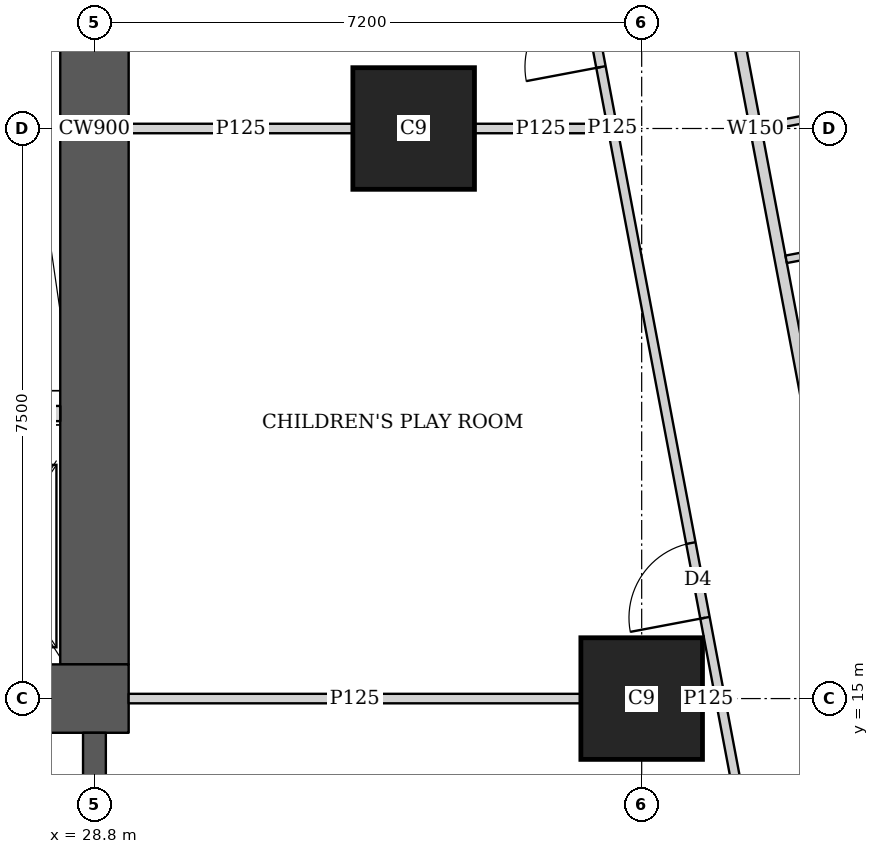
"""IFC4 building model, lengths in metres.
Left out: names, types, materials, properties, quantities, classifications, styles, units other than length and angle.
Written with IfcOpenShell. Run it as: python <this file> out.ifc"""

import sys

from ifc_helpers import new_model, si_unit, direction, frame, frame_2d, origin, origin_2d, place, context, subcontext, project, spatial, rectangle, extrude, element, fill, save


model = new_model("IFC4")
c1 = context("Model", 3, precision=1e-05, world=origin(), true_north=direction((0.0, 1.0)))
c2 = subcontext(c1, "Body", "Model", "MODEL_VIEW")
j1 = project(units=[si_unit("LENGTHUNIT", "METRE"), si_unit("PLANEANGLEUNIT", "RADIAN")], contexts=[c1])
p1 = place(None, origin())
s1 = spatial("IfcSite", under=j1, at=p1, CompositionType="ELEMENT")
p2 = place(p1, origin())
s2 = spatial("IfcBuilding", under=s1, at=p2, CompositionType="ELEMENT")
p3 = place(p2, frame((0.0, 0.0, 89.15)))
s3 = spatial("IfcBuildingStorey", under=s2, at=p3, CompositionType="ELEMENT", Elevation=89.15)
for number, where, z_axis, x_axis in (
    (1, (36.0, 15.0, 0.0), (0.0, 0.0, 1.0), (1.0, 0.0, 0.0)),
    (2, (33.0, 22.5, 0.0), (0.0, 0.0, 1.0), (1.0, 0.0, 0.0)),
):
    element("IfcColumn", number, at=place(p3, frame(where, z_axis=z_axis, x_axis=x_axis)), inside=s3, PredefinedType="COLUMN", context=c2, shape_type="SweptSolid", body=[
        extrude(rectangle(XDim=1.6, YDim=1.6, at=origin_2d()), origin(), (0.0, 0.0, 1.0), 3.75),
    ])
p4 = place(p3, frame((13.95, 15.0, 0.0), z_axis=(0.0, 0.0, 1.0), x_axis=(1.0, 0.0, 0.0)))
e3 = element("IfcWall", 3, at=p4, inside=s3, PredefinedType="SHEAR", context=c2, shape_type="SweptSolid", body=[
    extrude(rectangle(XDim=15.3, YDim=0.9, at=frame_2d((7.65, 0.0))), origin(), (0.0, 0.0, 1.0), 3.75),
])
p5 = place(p4, frame((4.45, 0.0, 0.0)))
e4 = element("IfcOpeningElement", 4, at=p5, cuts=e3, PredefinedType="OPENING", context=c2, shape_type="SweptSolid", body=[
    extrude(rectangle(XDim=1.8, YDim=2.1, at=frame_2d((0.9, 1.05))), frame((0.0, 0.46, 0.0), z_axis=(0.0, -1.0, 0.0), x_axis=(1.0, 0.0, 0.0)), (0.0, 0.0, 1.0), 0.92),
])
p6 = place(p4, frame((10.7, 0.0, 0.0)))
e5 = element("IfcOpeningElement", 5, at=p6, cuts=e3, PredefinedType="OPENING", context=c2, shape_type="SweptSolid", body=[
    extrude(rectangle(XDim=1.1, YDim=2.1, at=frame_2d((0.55, 1.05))), frame((0.0, 0.46, 0.0), z_axis=(0.0, -1.0, 0.0), x_axis=(1.0, 0.0, 0.0)), (0.0, 0.0, 1.0), 0.92),
])
p7 = place(p3, frame((28.8, 15.45, 0.0), z_axis=(0.0, 0.0, 1.0), x_axis=(0.0, 1.0, 0.0)))
e6 = element("IfcWall", 6, at=p7, inside=s3, PredefinedType="SHEAR", context=c2, shape_type="SweptSolid", body=[
    extrude(rectangle(XDim=14.1, YDim=0.9, at=frame_2d((7.05, 0.0))), origin(), (0.0, 0.0, 1.0), 3.75),
])
p8 = place(p3, frame((28.8, 10.35, 0.0), z_axis=(0.0, 0.0, 1.0), x_axis=(0.0, 1.0, 0.0)))
e7 = element("IfcWall", 7, at=p8, inside=s3, PredefinedType="SHEAR", context=c2, shape_type="SweptSolid", body=[
    extrude(rectangle(XDim=4.2, YDim=0.3, at=frame_2d((2.1, 0.0))), origin(), (0.0, 0.0, 1.0), 3.75),
])
p9 = place(p3, frame((33.127, 45.65, 0.0), z_axis=(0.0, 0.0, 1.0), x_axis=(0.185598547723, -0.98262565562, 0.0)))
e8 = element("IfcWall", 8, at=p9, inside=s3, PredefinedType="SOLIDWALL", context=c2, shape_type="SweptSolid", body=[
    extrude(rectangle(XDim=47.118, YDim=0.15, at=frame_2d((23.559, 0.0))), origin(), (0.0, 0.0, 1.0), 2.2),
])
p10 = place(p9, frame((15.285, 0.0, 0.0)))
e9 = element("IfcOpeningElement", 9, at=p10, cuts=e8, PredefinedType="OPENING", context=c2, shape_type="SweptSolid", body=[
    extrude(rectangle(XDim=1.0, YDim=2.1, at=frame_2d((0.5, 1.05))), frame((0.0, 0.085, 0.0), z_axis=(0.0, -1.0, 0.0), x_axis=(1.0, 0.0, 0.0)), (0.0, 0.0, 1.0), 0.17),
])
p11 = place(p9, frame((19.102, 0.0, 0.0)))
e10 = element("IfcOpeningElement", 10, at=p11, cuts=e8, PredefinedType="OPENING", context=c2, shape_type="SweptSolid", body=[
    extrude(rectangle(XDim=1.0, YDim=2.1, at=frame_2d((0.5, 1.05))), frame((0.0, 0.085, 0.0), z_axis=(0.0, -1.0, 0.0), x_axis=(1.0, 0.0, 0.0)), (0.0, 0.0, 1.0), 0.17),
])
p12 = place(p9, frame((33.88, 0.0, 0.0)))
e11 = element("IfcOpeningElement", 11, at=p12, cuts=e8, PredefinedType="OPENING", context=c2, shape_type="SweptSolid", body=[
    extrude(rectangle(XDim=1.0, YDim=2.1, at=frame_2d((0.5, 1.05))), frame((0.0, 0.085, 0.0), z_axis=(0.0, -1.0, 0.0), x_axis=(1.0, 0.0, 0.0)), (0.0, 0.0, 1.0), 0.17),
])
p13 = place(p3, frame((41.365, 21.433, 0.0), z_axis=(0.0, 0.0, 1.0), x_axis=(-0.982638553676, -0.185530247748, 0.0)))
e12 = element("IfcWall", 12, at=p13, inside=s3, PredefinedType="PARTITIONING", context=c2, shape_type="SweptSolid", body=[
    extrude(rectangle(XDim=3.525, YDim=0.1, at=frame_2d((1.763, 0.0))), origin(), (0.0, 0.0, 1.0), 3.5),
])
p14 = place(p3, frame((41.037, 23.168, 0.0), z_axis=(0.0, 0.0, 1.0), x_axis=(-0.982638553676, -0.185530247748, 0.0)))
e13 = element("IfcWall", 13, at=p14, inside=s3, PredefinedType="PARTITIONING", context=c2, shape_type="SweptSolid", body=[
    extrude(rectangle(XDim=3.525, YDim=0.1, at=frame_2d((1.763, 0.0))), origin(), (0.0, 0.0, 1.0), 2.5),
])
p15 = place(p3, frame((37.9, 10.413, 0.0), z_axis=(0.0, 0.0, 1.0), x_axis=(-0.185589740669, 0.982627319058, 0.0)))
e14 = element("IfcWall", 14, at=p15, inside=s3, PredefinedType="PARTITIONING", context=c2, shape_type="SweptSolid", body=[
    extrude(rectangle(XDim=24.602, YDim=0.125, at=frame_2d((12.301, 0.0))), origin(), (0.0, 0.0, 1.0), 2.5),
])
p16 = place(p15, frame((0.708, 0.0, 0.0)))
e15 = element("IfcOpeningElement", 15, at=p16, cuts=e14, PredefinedType="OPENING", context=c2, shape_type="SweptSolid", body=[
    extrude(rectangle(XDim=1.0, YDim=2.1, at=frame_2d((0.5, 1.05))), frame((0.0, 0.073, 0.0), z_axis=(0.0, -1.0, 0.0), x_axis=(1.0, 0.0, 0.0)), (0.0, 0.0, 1.0), 0.145),
])
p17 = place(p15, frame((5.75, 0.0, 0.0)))
e16 = element("IfcOpeningElement", 16, at=p17, cuts=e14, PredefinedType="OPENING", context=c2, shape_type="SweptSolid", body=[
    extrude(rectangle(XDim=1.0, YDim=2.1, at=frame_2d((0.5, 1.05))), frame((0.0, 0.073, 0.0), z_axis=(0.0, -1.0, 0.0), x_axis=(1.0, 0.0, 0.0)), (0.0, 0.0, 1.0), 0.145),
])
p18 = place(p15, frame((13.124, 0.0, 0.0)))
e17 = element("IfcOpeningElement", 17, at=p18, cuts=e14, PredefinedType="OPENING", context=c2, shape_type="SweptSolid", body=[
    extrude(rectangle(XDim=1.0, YDim=2.1, at=frame_2d((0.5, 1.05))), frame((0.0, 0.073, 0.0), z_axis=(0.0, -1.0, 0.0), x_axis=(1.0, 0.0, 0.0)), (0.0, 0.0, 1.0), 0.145),
])
p19 = place(p15, frame((16.94, 0.0, 0.0)))
e18 = element("IfcOpeningElement", 18, at=p19, cuts=e14, PredefinedType="OPENING", context=c2, shape_type="SweptSolid", body=[
    extrude(rectangle(XDim=1.0, YDim=2.1, at=frame_2d((0.5, 1.05))), frame((0.0, 0.073, 0.0), z_axis=(0.0, -1.0, 0.0), x_axis=(1.0, 0.0, 0.0)), (0.0, 0.0, 1.0), 0.145),
])
p20 = place(p15, frame((21.0, 0.0, 0.0)))
e19 = element("IfcOpeningElement", 19, at=p20, cuts=e14, PredefinedType="OPENING", context=c2, shape_type="SweptSolid", body=[
    extrude(rectangle(XDim=1.0, YDim=2.1, at=frame_2d((0.5, 1.05))), frame((0.0, 0.073, 0.0), z_axis=(0.0, -1.0, 0.0), x_axis=(1.0, 0.0, 0.0)), (0.0, 0.0, 1.0), 0.145),
])
p21 = place(p3, frame((29.25, 15.0, 0.0), z_axis=(0.0, 0.0, 1.0), x_axis=(1.0, 0.0, 0.0)))
e20 = element("IfcWall", 20, at=p21, inside=s3, PredefinedType="PARTITIONING", context=c2, shape_type="SweptSolid", body=[
    extrude(rectangle(XDim=5.949, YDim=0.125, at=frame_2d((2.975, 0.0))), origin(), (0.0, 0.0, 1.0), 3.5),
])
p22 = place(p3, frame((36.801, 15.0, 0.0), z_axis=(0.0, 0.0, 1.0), x_axis=(1.0, 0.0, 0.0)))
e21 = element("IfcWall", 21, at=p22, inside=s3, PredefinedType="PARTITIONING", context=c2, shape_type="SweptSolid", body=[
    extrude(rectangle(XDim=0.157, YDim=0.125, at=frame_2d((0.079, 0.0))), origin(), (0.0, 0.0, 1.0), 3.5),
])
p23 = place(p3, frame((29.25, 22.5, 0.0), z_axis=(0.0, 0.0, 1.0), x_axis=(1.0, 0.0, 0.0)))
e22 = element("IfcWall", 22, at=p23, inside=s3, PredefinedType="PARTITIONING", context=c2, shape_type="SweptSolid", body=[
    extrude(rectangle(XDim=2.949, YDim=0.125, at=frame_2d((1.475, 0.0))), origin(), (0.0, 0.0, 1.0), 3.5),
])
p24 = place(p3, frame((33.801, 22.5, 0.0), z_axis=(0.0, 0.0, 1.0), x_axis=(1.0, 0.0, 0.0)))
e23 = element("IfcWall", 23, at=p24, inside=s3, PredefinedType="PARTITIONING", context=c2, shape_type="SweptSolid", body=[
    extrude(rectangle(XDim=1.741, YDim=0.125, at=frame_2d((0.871, 0.0))), origin(), (0.0, 0.0, 1.0), 2.5),
])
p25 = place(p3, frame((27.4, 18.75, 0.0), z_axis=(0.0, 0.0, 1.0), x_axis=(1.0, 0.0, 0.0)))
e24 = element("IfcWall", 24, at=p25, inside=s3, PredefinedType="SOLIDWALL", context=c2, shape_type="SweptSolid", body=[
    extrude(rectangle(XDim=0.95, YDim=0.2, at=frame_2d((0.475, 0.0))), origin(), (0.0, 0.0, 1.0), 3.5),
])
p26 = place(p17, origin())
e25 = element("IfcDoor", 25, at=p26, inside=s3, OperationType="SINGLE_SWING_LEFT", PredefinedType="DOOR", context=c2, shape_type="SweptSolid", body=[
    extrude(rectangle(XDim=1.0, YDim=2.1, at=frame_2d((0.5, 1.05))), frame((0.0, 0.025, 0.0), z_axis=(0.0, -1.0, 0.0), x_axis=(1.0, 0.0, 0.0)), (0.0, 0.0, 1.0), 0.05),
])
fill(e16, e25)
p27 = place(p18, origin())
e26 = element("IfcDoor", 26, at=p27, inside=s3, OperationType="SINGLE_SWING_LEFT", PredefinedType="DOOR", context=c2, shape_type="SweptSolid", body=[
    extrude(rectangle(XDim=1.0, YDim=2.1, at=frame_2d((0.5, 1.05))), frame((0.0, 0.025, 0.0), z_axis=(0.0, -1.0, 0.0), x_axis=(1.0, 0.0, 0.0)), (0.0, 0.0, 1.0), 0.05),
])
fill(e17, e26)
save(model, sys.argv[1])
